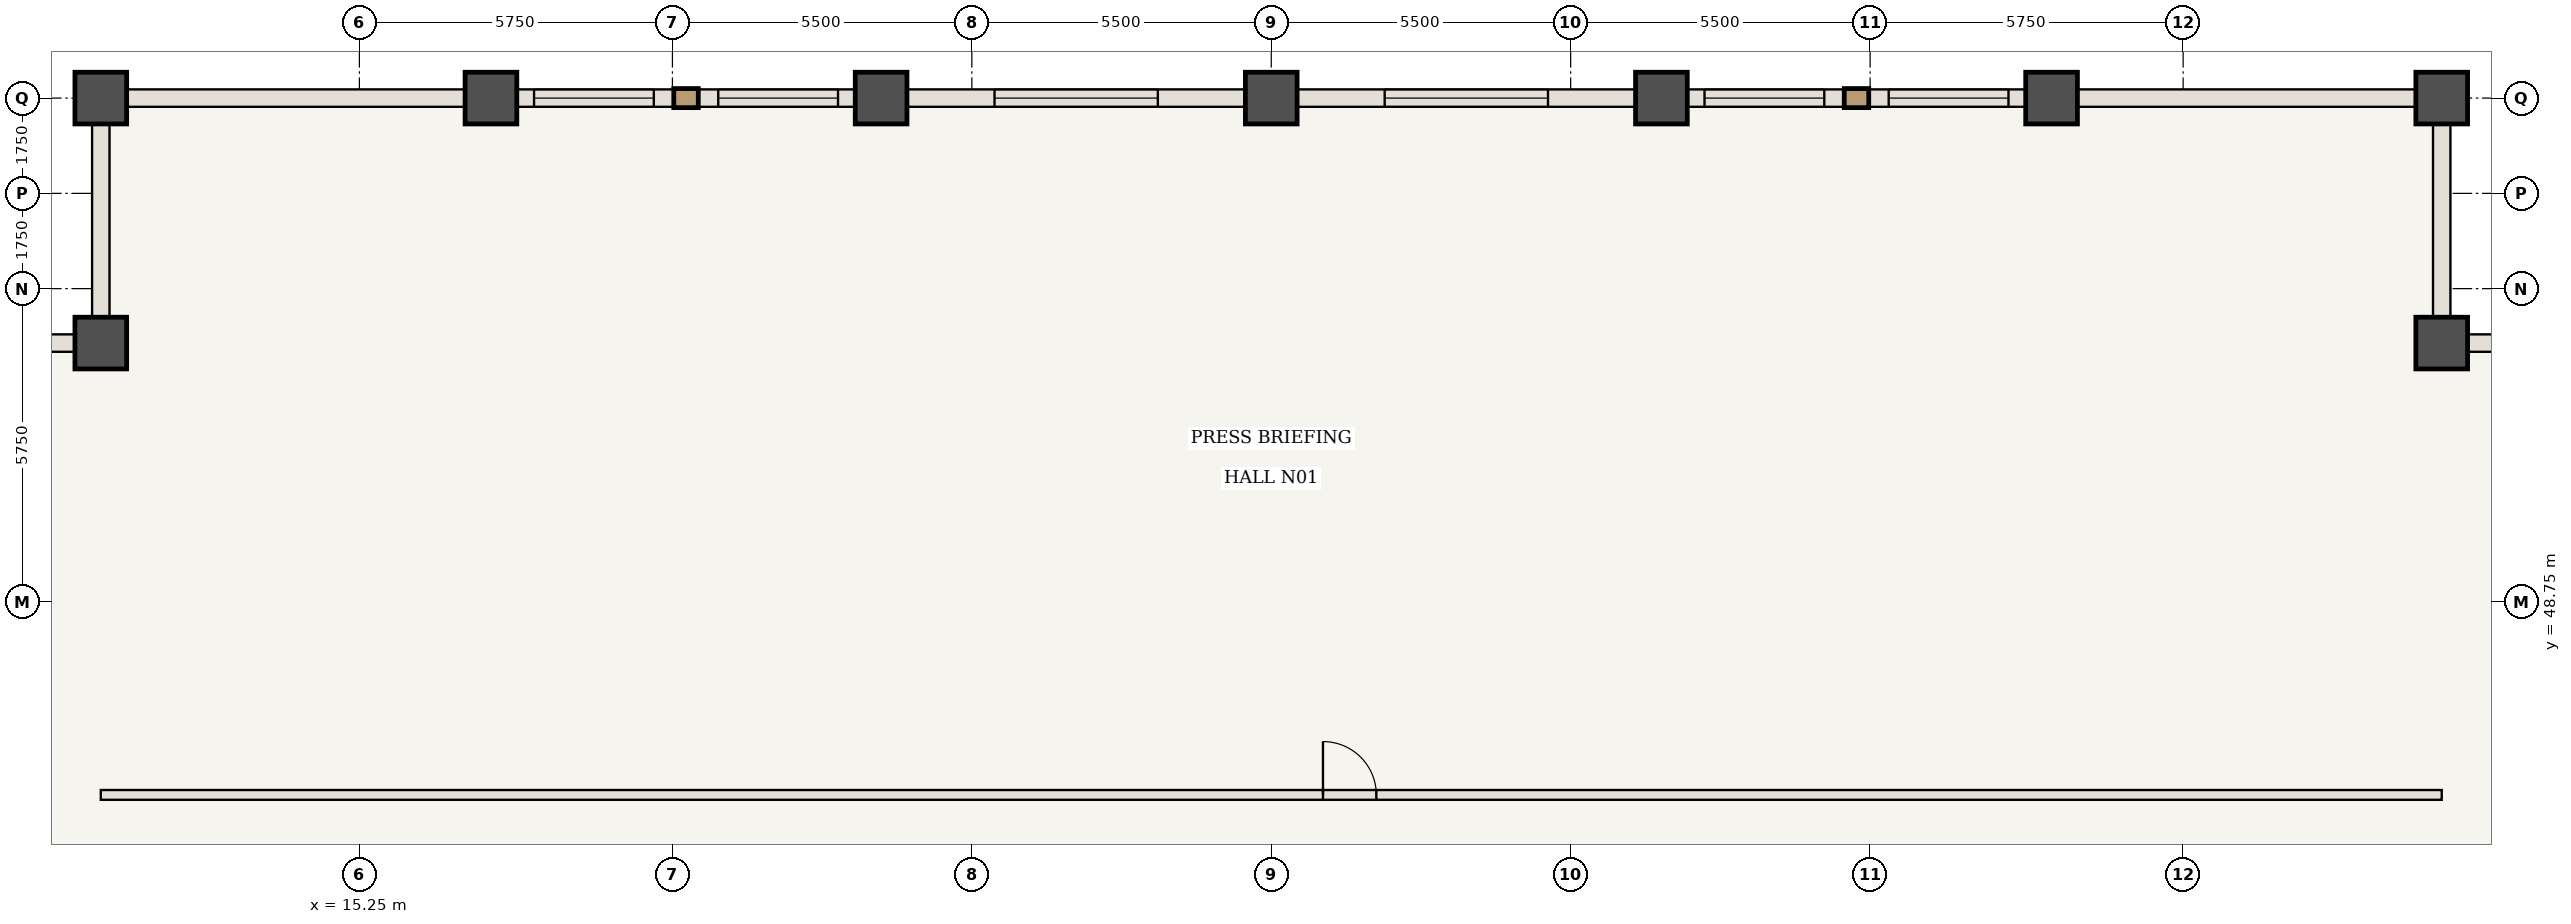
"""IFC4 building model, lengths in metres.
Left out: names, types, materials, properties, quantities, classifications, styles, units other than length and angle.
Written with IfcOpenShell. Run it as: python <this file> out.ifc"""

import sys

from ifc_helpers import new_model, si_unit, direction, frame, frame_2d, origin, origin_2d, place, context, subcontext, project, spatial, rectangle, extrude, element, fill, save


model = new_model("IFC4")
c1 = context("Model", 3, precision=1e-05, world=origin(), true_north=direction((0.0, 1.0)))
c2 = subcontext(c1, "Body", "Model", "MODEL_VIEW")
j1 = project(units=[si_unit("LENGTHUNIT", "METRE"), si_unit("PLANEANGLEUNIT", "RADIAN")], contexts=[c1])
p1 = place(None, origin())
s1 = spatial("IfcSite", under=j1, at=p1, CompositionType="ELEMENT")
p2 = place(p1, origin())
s2 = spatial("IfcBuilding", under=s1, at=p2, CompositionType="ELEMENT")
p3 = place(p2, frame((0.0, 0.0, 164.5)))
s3 = spatial("IfcBuildingStorey", under=s2, at=p3, CompositionType="ELEMENT", Elevation=164.5)
for number, where, z_axis, x_axis in (
    (1, (53.5, 53.5, 0.0), (0.0, 0.0, 1.0), (1.0, 0.0, 0.0)),
    (2, (53.5, 58.0, 0.0), (0.0, 0.0, 1.0), (1.0, 0.0, 0.0)),
    (3, (10.5, 58.0, 0.0), (0.0, 0.0, 1.0), (1.0, 0.0, 0.0)),
    (4, (10.5, 53.5, 0.0), (0.0, 0.0, 1.0), (1.0, 0.0, 0.0)),
    (5, (17.667, 58.0, 0.0), (0.0, 0.0, 1.0), (1.0, 0.0, 0.0)),
    (6, (24.833, 58.0, 0.0), (0.0, 0.0, 1.0), (1.0, 0.0, 0.0)),
    (7, (32.0, 58.0, 0.0), (0.0, 0.0, 1.0), (1.0, 0.0, 0.0)),
    (8, (39.167, 58.0, 0.0), (0.0, 0.0, 1.0), (1.0, 0.0, 0.0)),
    (9, (46.333, 58.0, 0.0), (0.0, 0.0, 1.0), (1.0, 0.0, 0.0)),
):
    element("IfcColumn", number, at=place(p3, frame(where, z_axis=z_axis, x_axis=x_axis)), inside=s3, PredefinedType="COLUMN", context=c2, shape_type="SweptSolid", body=[
        extrude(rectangle(XDim=0.95, YDim=0.95, at=origin_2d()), origin(), (0.0, 0.0, 1.0), 3.85),
    ])
p4 = place(p3, frame((10.5, 45.2, 0.0), z_axis=(0.0, 0.0, 1.0), x_axis=(1.0, 0.0, 0.0)))
e10 = element("IfcWall", 10, at=p4, inside=s3, PredefinedType="STANDARD", context=c2, shape_type="SweptSolid", body=[
    extrude(rectangle(XDim=43.0, YDim=0.18, at=frame_2d((21.5, 0.0))), origin(), (0.0, 0.0, 1.0), 3.685),
])
p5 = place(p4, frame((22.45, 0.0, 0.0)))
e11 = element("IfcOpeningElement", 11, at=p5, cuts=e10, PredefinedType="OPENING", context=c2, shape_type="SweptSolid", body=[
    extrude(rectangle(XDim=0.98, YDim=2.2, at=frame_2d((0.49, 1.1))), frame((0.0, 0.1, 0.0), z_axis=(0.0, -1.0, 0.0), x_axis=(1.0, 0.0, 0.0)), (0.0, 0.0, 1.0), 0.2),
])
p6 = place(p3, frame((10.5, 58.0, 0.0), z_axis=(0.0, 0.0, 1.0), x_axis=(1.0, 0.0, 0.0)))
e12 = element("IfcWall", 12, at=p6, inside=s3, PredefinedType="USERDEFINED", context=c2, shape_type="SweptSolid", body=[
    extrude(rectangle(XDim=7.167, YDim=0.32, at=frame_2d((3.583, 0.0))), origin(), (0.0, 0.0, 1.0), 2.885),
])
p7 = place(p3, frame((17.667, 58.0, 0.0), z_axis=(0.0, 0.0, 1.0), x_axis=(1.0, 0.0, 0.0)))
e13 = element("IfcWall", 13, at=p7, inside=s3, PredefinedType="USERDEFINED", context=c2, shape_type="SweptSolid", body=[
    extrude(rectangle(XDim=7.167, YDim=0.32, at=frame_2d((3.583, 0.0))), origin(), (0.0, 0.0, 1.0), 2.885),
])
p8 = place(p7, frame((0.792, 0.0, 0.85)))
e14 = element("IfcOpeningElement", 14, at=p8, cuts=e13, PredefinedType="OPENING", context=c2, shape_type="SweptSolid", body=[
    extrude(rectangle(XDim=2.2, YDim=1.835, at=frame_2d((1.1, 0.917))), frame((0.0, 0.17, 0.0), z_axis=(0.0, -1.0, 0.0), x_axis=(1.0, 0.0, 0.0)), (0.0, 0.0, 1.0), 0.34),
])
p9 = place(p7, frame((4.175, 0.0, 0.85)))
e15 = element("IfcOpeningElement", 15, at=p9, cuts=e13, PredefinedType="OPENING", context=c2, shape_type="SweptSolid", body=[
    extrude(rectangle(XDim=2.2, YDim=1.835, at=frame_2d((1.1, 0.917))), frame((0.0, 0.17, 0.0), z_axis=(0.0, -1.0, 0.0), x_axis=(1.0, 0.0, 0.0)), (0.0, 0.0, 1.0), 0.34),
])
p10 = place(p3, frame((24.833, 58.0, 0.0), z_axis=(0.0, 0.0, 1.0), x_axis=(1.0, 0.0, 0.0)))
e16 = element("IfcWall", 16, at=p10, inside=s3, PredefinedType="USERDEFINED", context=c2, shape_type="SweptSolid", body=[
    extrude(rectangle(XDim=7.167, YDim=0.32, at=frame_2d((3.583, 0.0))), origin(), (0.0, 0.0, 1.0), 2.885),
])
p11 = place(p10, frame((2.083, 0.0, 0.85)))
e17 = element("IfcOpeningElement", 17, at=p11, cuts=e16, PredefinedType="OPENING", context=c2, shape_type="SweptSolid", body=[
    extrude(rectangle(XDim=3.0, YDim=1.835, at=frame_2d((1.5, 0.917))), frame((0.0, 0.17, 0.0), z_axis=(0.0, -1.0, 0.0), x_axis=(1.0, 0.0, 0.0)), (0.0, 0.0, 1.0), 0.34),
])
p12 = place(p3, frame((32.0, 58.0, 0.0), z_axis=(0.0, 0.0, 1.0), x_axis=(1.0, 0.0, 0.0)))
e18 = element("IfcWall", 18, at=p12, inside=s3, PredefinedType="USERDEFINED", context=c2, shape_type="SweptSolid", body=[
    extrude(rectangle(XDim=7.167, YDim=0.32, at=frame_2d((3.583, 0.0))), origin(), (0.0, 0.0, 1.0), 2.885),
])
p13 = place(p12, frame((2.083, 0.0, 0.85)))
e19 = element("IfcOpeningElement", 19, at=p13, cuts=e18, PredefinedType="OPENING", context=c2, shape_type="SweptSolid", body=[
    extrude(rectangle(XDim=3.0, YDim=1.835, at=frame_2d((1.5, 0.917))), frame((0.0, 0.17, 0.0), z_axis=(0.0, -1.0, 0.0), x_axis=(1.0, 0.0, 0.0)), (0.0, 0.0, 1.0), 0.34),
])
p14 = place(p3, frame((39.167, 58.0, 0.0), z_axis=(0.0, 0.0, 1.0), x_axis=(1.0, 0.0, 0.0)))
e20 = element("IfcWall", 20, at=p14, inside=s3, PredefinedType="USERDEFINED", context=c2, shape_type="SweptSolid", body=[
    extrude(rectangle(XDim=7.167, YDim=0.32, at=frame_2d((3.583, 0.0))), origin(), (0.0, 0.0, 1.0), 2.885),
])
p15 = place(p14, frame((0.792, 0.0, 0.85)))
e21 = element("IfcOpeningElement", 21, at=p15, cuts=e20, PredefinedType="OPENING", context=c2, shape_type="SweptSolid", body=[
    extrude(rectangle(XDim=2.2, YDim=1.835, at=frame_2d((1.1, 0.917))), frame((0.0, 0.17, 0.0), z_axis=(0.0, -1.0, 0.0), x_axis=(1.0, 0.0, 0.0)), (0.0, 0.0, 1.0), 0.34),
])
p16 = place(p14, frame((4.175, 0.0, 0.85)))
e22 = element("IfcOpeningElement", 22, at=p16, cuts=e20, PredefinedType="OPENING", context=c2, shape_type="SweptSolid", body=[
    extrude(rectangle(XDim=2.2, YDim=1.835, at=frame_2d((1.1, 0.917))), frame((0.0, 0.17, 0.0), z_axis=(0.0, -1.0, 0.0), x_axis=(1.0, 0.0, 0.0)), (0.0, 0.0, 1.0), 0.34),
])
p17 = place(p3, frame((46.333, 58.0, 0.0), z_axis=(0.0, 0.0, 1.0), x_axis=(1.0, 0.0, 0.0)))
e23 = element("IfcWall", 23, at=p17, inside=s3, PredefinedType="USERDEFINED", context=c2, shape_type="SweptSolid", body=[
    extrude(rectangle(XDim=7.167, YDim=0.32, at=frame_2d((3.583, 0.0))), origin(), (0.0, 0.0, 1.0), 2.885),
])
for number, where, z_axis, x_axis in (
    (24, (53.5, 53.5, 0.0), (0.0, 0.0, 1.0), (1.0, 0.0, 0.0)),
    (25, (53.5, 58.0, 0.0), (0.0, 0.0, 1.0), (0.0, -1.0, 0.0)),
    (26, (10.5, 53.5, 0.0), (0.0, 0.0, 1.0), (0.0, 1.0, 0.0)),
    (27, (6.0, 53.5, 0.0), (0.0, 0.0, 1.0), (1.0, 0.0, 0.0)),
):
    element("IfcWall", number, at=place(p3, frame(where, z_axis=z_axis, x_axis=x_axis)), inside=s3, PredefinedType="USERDEFINED", context=c2, shape_type="SweptSolid", body=[
        extrude(rectangle(XDim=4.5, YDim=0.32, at=frame_2d((2.25, 0.0))), origin(), (0.0, 0.0, 1.0), 2.885),
    ])
p18 = place(p5, origin())
e28 = element("IfcDoor", 28, at=p18, inside=s3, OperationType="SINGLE_SWING_LEFT", PredefinedType="DOOR", context=c2, shape_type="SweptSolid", body=[
    extrude(rectangle(XDim=0.98, YDim=2.2, at=frame_2d((0.49, 1.1))), frame((0.0, 0.025, 0.0), z_axis=(0.0, -1.0, 0.0), x_axis=(1.0, 0.0, 0.0)), (0.0, 0.0, 1.0), 0.05),
])
fill(e11, e28)
p19 = place(p8, origin())
e29 = element("IfcWindow", 29, at=p19, inside=s3, PartitioningType="SINGLE_PANEL", PredefinedType="WINDOW", context=c2, shape_type="SweptSolid", body=[
    extrude(rectangle(XDim=2.2, YDim=1.835, at=frame_2d((1.1, 0.917))), frame((0.0, 0.03, 0.0), z_axis=(0.0, -1.0, 0.0), x_axis=(1.0, 0.0, 0.0)), (0.0, 0.0, 1.0), 0.06),
])
fill(e14, e29)
p20 = place(p9, origin())
e30 = element("IfcWindow", 30, at=p20, inside=s3, PartitioningType="SINGLE_PANEL", PredefinedType="WINDOW", context=c2, shape_type="SweptSolid", body=[
    extrude(rectangle(XDim=2.2, YDim=1.835, at=frame_2d((1.1, 0.917))), frame((0.0, 0.03, 0.0), z_axis=(0.0, -1.0, 0.0), x_axis=(1.0, 0.0, 0.0)), (0.0, 0.0, 1.0), 0.06),
])
fill(e15, e30)
p21 = place(p11, origin())
e31 = element("IfcWindow", 31, at=p21, inside=s3, PartitioningType="SINGLE_PANEL", PredefinedType="WINDOW", context=c2, shape_type="SweptSolid", body=[
    extrude(rectangle(XDim=3.0, YDim=1.835, at=frame_2d((1.5, 0.917))), frame((0.0, 0.03, 0.0), z_axis=(0.0, -1.0, 0.0), x_axis=(1.0, 0.0, 0.0)), (0.0, 0.0, 1.0), 0.06),
])
fill(e17, e31)
p22 = place(p13, origin())
e32 = element("IfcWindow", 32, at=p22, inside=s3, PartitioningType="SINGLE_PANEL", PredefinedType="WINDOW", context=c2, shape_type="SweptSolid", body=[
    extrude(rectangle(XDim=3.0, YDim=1.835, at=frame_2d((1.5, 0.917))), frame((0.0, 0.03, 0.0), z_axis=(0.0, -1.0, 0.0), x_axis=(1.0, 0.0, 0.0)), (0.0, 0.0, 1.0), 0.06),
])
fill(e19, e32)
p23 = place(p15, origin())
e33 = element("IfcWindow", 33, at=p23, inside=s3, PartitioningType="SINGLE_PANEL", PredefinedType="WINDOW", context=c2, shape_type="SweptSolid", body=[
    extrude(rectangle(XDim=2.2, YDim=1.835, at=frame_2d((1.1, 0.917))), frame((0.0, 0.03, 0.0), z_axis=(0.0, -1.0, 0.0), x_axis=(1.0, 0.0, 0.0)), (0.0, 0.0, 1.0), 0.06),
])
fill(e21, e33)
p24 = place(p16, origin())
e34 = element("IfcWindow", 34, at=p24, inside=s3, PartitioningType="SINGLE_PANEL", PredefinedType="WINDOW", context=c2, shape_type="SweptSolid", body=[
    extrude(rectangle(XDim=2.2, YDim=1.835, at=frame_2d((1.1, 0.917))), frame((0.0, 0.03, 0.0), z_axis=(0.0, -1.0, 0.0), x_axis=(1.0, 0.0, 0.0)), (0.0, 0.0, 1.0), 0.06),
])
fill(e22, e34)
save(model, sys.argv[1])
